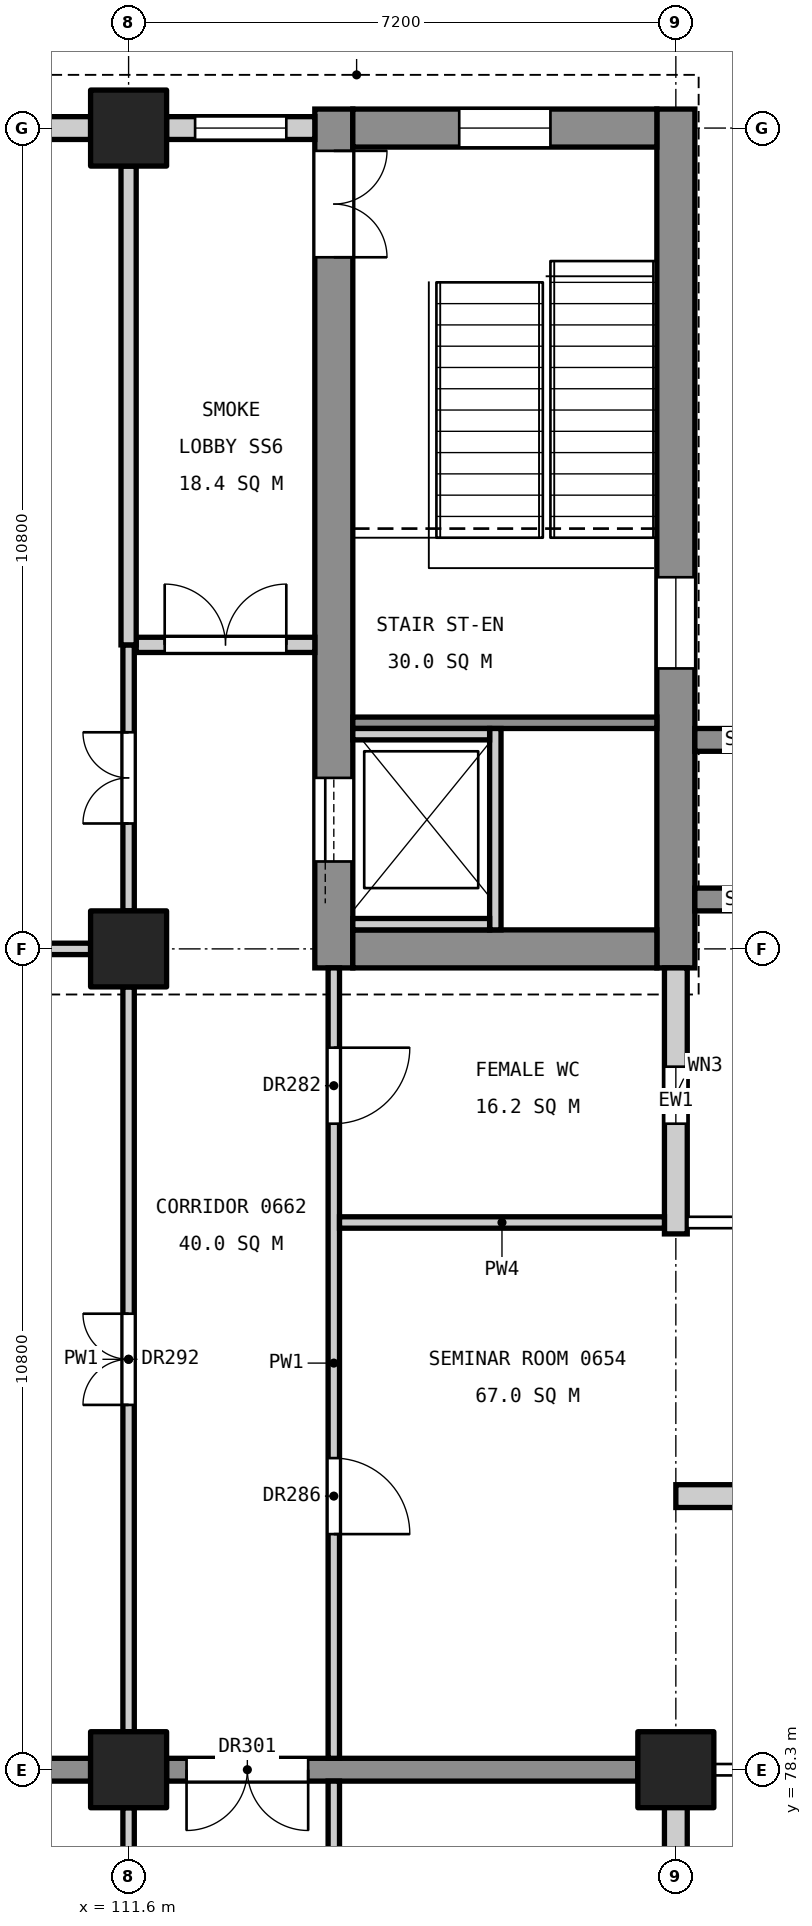
"""IFC4 building model, lengths in metres.
Left out: names, types, materials, properties, quantities, classifications, styles, units other than length and angle.
Written with IfcOpenShell. Run it as: python <this file> out.ifc"""

import sys

from ifc_helpers import new_model, si_unit, direction, frame, frame_2d, origin, origin_2d, place, context, subcontext, project, spatial, rectangle, extrude, element, fill, save


model = new_model("IFC4")
c1 = context("Model", 3, precision=1e-05, world=origin(), true_north=direction((0.0, 1.0)))
c2 = subcontext(c1, "Body", "Model", "MODEL_VIEW")
j1 = project(units=[si_unit("LENGTHUNIT", "METRE"), si_unit("PLANEANGLEUNIT", "RADIAN")], contexts=[c1])
p1 = place(None, origin())
s1 = spatial("IfcSite", under=j1, at=p1, CompositionType="ELEMENT")
p2 = place(p1, origin())
s2 = spatial("IfcBuilding", under=s1, at=p2, CompositionType="ELEMENT")
p3 = place(p2, frame((0.0, 0.0, 31.8)))
s3 = spatial("IfcBuildingStorey", under=s2, at=p3, CompositionType="ELEMENT", Elevation=31.8)
for number, where, z_axis, x_axis in (
    (1, (118.8, 78.3, 0.0), (0.0, 0.0, 1.0), (1.0, 0.0, 0.0)),
    (2, (111.6, 78.3, 0.0), (0.0, 0.0, 1.0), (1.0, 0.0, 0.0)),
    (3, (111.6, 89.1, 0.0), (0.0, 0.0, 1.0), (1.0, 0.0, 0.0)),
    (4, (111.6, 99.9, 0.0), (0.0, 0.0, 1.0), (1.0, 0.0, 0.0)),
):
    element("IfcColumn", number, at=place(p3, frame(where, z_axis=z_axis, x_axis=x_axis)), inside=s3, PredefinedType="COLUMN", context=c2, shape_type="SweptSolid", body=[
        extrude(rectangle(XDim=1.0, YDim=1.0, at=origin_2d()), origin(), (0.0, 0.0, 1.0), 4.8),
    ])
p4 = place(p3, frame((118.8, 88.85, 0.0), z_axis=(0.0, 0.0, 1.0), x_axis=(0.0, 1.0, 0.0)))
e5 = element("IfcWall", 5, at=p4, inside=s3, PredefinedType="SHEAR", context=c2, shape_type="SweptSolid", body=[
    extrude(rectangle(XDim=11.3, YDim=0.5, at=frame_2d((5.65, 0.0))), origin(), (0.0, 0.0, 1.0), 4.55),
])
p5 = place(p4, frame((3.94, 0.0, 3.4)))
e6 = element("IfcOpeningElement", 6, at=p5, cuts=e5, PredefinedType="OPENING", context=c2, shape_type="SweptSolid", body=[
    extrude(rectangle(XDim=1.2, YDim=0.9, at=frame_2d((0.6, 0.45))), frame((0.0, 0.26, 0.0), z_axis=(0.0, -1.0, 0.0), x_axis=(1.0, 0.0, 0.0)), (0.0, 0.0, 1.0), 0.52),
])
p6 = place(p3, frame((114.3, 88.85, 0.0), z_axis=(0.0, 0.0, 1.0), x_axis=(0.0, 1.0, 0.0)))
e7 = element("IfcWall", 7, at=p6, inside=s3, PredefinedType="SHEAR", context=c2, shape_type="SweptSolid", body=[
    extrude(rectangle(XDim=11.3, YDim=0.5, at=frame_2d((5.65, 0.0))), origin(), (0.0, 0.0, 1.0), 4.55),
])
p7 = place(p6, frame((9.35, 0.0, 0.0)))
e8 = element("IfcOpeningElement", 8, at=p7, cuts=e7, PredefinedType="OPENING", context=c2, shape_type="SweptSolid", body=[
    extrude(rectangle(XDim=1.4, YDim=2.1, at=frame_2d((0.7, 1.05))), frame((0.0, 0.26, 0.0), z_axis=(0.0, -1.0, 0.0), x_axis=(1.0, 0.0, 0.0)), (0.0, 0.0, 1.0), 0.52),
])
p8 = place(p6, frame((1.4, 0.0, 0.0)))
e9 = element("IfcOpeningElement", 9, at=p8, cuts=e7, PredefinedType="OPENING", context=c2, shape_type="SweptSolid", body=[
    extrude(rectangle(XDim=1.1, YDim=2.1, at=frame_2d((0.55, 1.05))), frame((0.0, 0.26, 0.0), z_axis=(0.0, -1.0, 0.0), x_axis=(1.0, 0.0, 0.0)), (0.0, 0.0, 1.0), 0.52),
])
p9 = place(p3, frame((118.55, 89.1, 0.0), z_axis=(0.0, 0.0, 1.0), x_axis=(-1.0, 0.0, 0.0)))
e10 = element("IfcWall", 10, at=p9, inside=s3, PredefinedType="SHEAR", context=c2, shape_type="SweptSolid", body=[
    extrude(rectangle(XDim=4.0, YDim=0.5, at=frame_2d((2.0, 0.0))), origin(), (0.0, 0.0, 1.0), 4.55),
])
p10 = place(p3, frame((118.55, 99.9, 0.0), z_axis=(0.0, 0.0, 1.0), x_axis=(-1.0, 0.0, 0.0)))
e11 = element("IfcWall", 11, at=p10, inside=s3, PredefinedType="SHEAR", context=c2, shape_type="SweptSolid", body=[
    extrude(rectangle(XDim=4.0, YDim=0.5, at=frame_2d((2.0, 0.0))), origin(), (0.0, 0.0, 1.0), 4.55),
])
p11 = place(p10, frame((1.4, 0.0, 3.4)))
e12 = element("IfcOpeningElement", 12, at=p11, cuts=e11, PredefinedType="OPENING", context=c2, shape_type="SweptSolid", body=[
    extrude(rectangle(XDim=1.2, YDim=0.9, at=frame_2d((0.6, 0.45))), frame((0.0, 0.26, 0.0), z_axis=(0.0, -1.0, 0.0), x_axis=(1.0, 0.0, 0.0)), (0.0, 0.0, 1.0), 0.52),
])
for number, where, z_axis, x_axis in (
    (13, (119.05, 89.75, 0.0), (0.0, 0.0, 1.0), (1.0, 0.0, 0.0)),
    (14, (119.05, 91.85, 0.0), (0.0, 0.0, 1.0), (1.0, 0.0, 0.0)),
):
    element("IfcWall", number, at=place(p3, frame(where, z_axis=z_axis, x_axis=x_axis)), inside=s3, PredefinedType="SHEAR", context=c2, shape_type="SweptSolid", body=[
        extrude(rectangle(XDim=1.25, YDim=0.3, at=frame_2d((0.625, 0.0))), origin(), (0.0, 0.0, 1.0), 4.8),
    ])
p12 = place(p3, frame((118.3, 78.3, 0.0), z_axis=(0.0, 0.0, 1.0), x_axis=(-1.0, 0.0, 0.0)))
e15 = element("IfcWall", 15, at=p12, inside=s3, PredefinedType="SHEAR", context=c2, shape_type="SweptSolid", body=[
    extrude(rectangle(XDim=6.2, YDim=0.3, at=frame_2d((3.1, 0.0))), origin(), (0.0, 0.0, 1.0), 4.55),
])
p13 = place(p12, frame((4.337, 0.0, 0.0)))
e16 = element("IfcOpeningElement", 16, at=p13, cuts=e15, PredefinedType="OPENING", context=c2, shape_type="SweptSolid", body=[
    extrude(rectangle(XDim=1.6, YDim=2.1, at=frame_2d((0.8, 1.05))), frame((0.0, 0.16, 0.0), z_axis=(0.0, -1.0, 0.0), x_axis=(1.0, 0.0, 0.0)), (0.0, 0.0, 1.0), 0.32),
])
p14 = place(p3, frame((111.1, 78.3, 0.0), z_axis=(0.0, 0.0, 1.0), x_axis=(-1.0, 0.0, 0.0)))
e17 = element("IfcWall", 17, at=p14, inside=s3, PredefinedType="SHEAR", context=c2, shape_type="SweptSolid", body=[
    extrude(rectangle(XDim=9.8, YDim=0.3, at=frame_2d((4.9, 0.0))), origin(), (0.0, 0.0, 1.0), 4.55),
])
p15 = place(p3, frame((118.55, 92.075, 0.0), z_axis=(0.0, 0.0, 1.0), x_axis=(-1.0, 0.0, 0.0)))
e18 = element("IfcWall", 18, at=p15, inside=s3, PredefinedType="SOLIDWALL", context=c2, shape_type="SweptSolid", body=[
    extrude(rectangle(XDim=4.0, YDim=0.15, at=frame_2d((2.0, 0.0))), origin(), (0.0, 0.0, 1.0), 4.55),
])
p16 = place(p3, frame((116.425, 92.0, 0.0), z_axis=(0.0, 0.0, 1.0), x_axis=(0.0, -1.0, 0.0)))
e19 = element("IfcWall", 19, at=p16, inside=s3, PredefinedType="SOLIDWALL", context=c2, shape_type="SweptSolid", body=[
    extrude(rectangle(XDim=2.65, YDim=0.15, at=frame_2d((1.325, 0.0))), origin(), (0.0, 0.0, 1.0), 4.8),
])
for number, where, z_axis, x_axis in (
    (20, (116.35, 91.925, 0.0), (0.0, 0.0, 1.0), (-1.0, 0.0, 0.0)),
    (21, (116.35, 89.425, 0.0), (0.0, 0.0, 1.0), (-1.0, 0.0, 0.0)),
):
    element("IfcWall", number, at=place(p3, frame(where, z_axis=z_axis, x_axis=x_axis)), inside=s3, PredefinedType="SOLIDWALL", context=c2, shape_type="SweptSolid", body=[
        extrude(rectangle(XDim=1.8, YDim=0.15, at=frame_2d((0.9, 0.0))), origin(), (0.0, 0.0, 1.0), 4.8),
    ])
p17 = place(p3, frame((118.8, 74.95, 0.0), z_axis=(0.0, 0.0, 1.0), x_axis=(0.0, 1.0, 0.0)))
e22 = element("IfcWall", 22, at=p17, inside=s3, PredefinedType="STANDARD", context=c2, shape_type="SweptSolid", body=[
    extrude(rectangle(XDim=3.5, YDim=0.3, at=frame_2d((1.75, 0.0))), origin(), (0.0, 0.0, 1.0), 3.65),
])
p18 = place(p17, frame((1.3, 0.0, 0.8)))
e23 = element("IfcOpeningElement", 23, at=p18, cuts=e22, PredefinedType="OPENING", context=c2, shape_type="SweptSolid", body=[
    extrude(rectangle(XDim=0.75, YDim=1.2, at=frame_2d((0.375, 0.6))), frame((0.0, 0.16, 0.0), z_axis=(0.0, -1.0, 0.0), x_axis=(1.0, 0.0, 0.0)), (0.0, 0.0, 1.0), 0.32),
])
p19 = place(p3, frame((118.8, 85.35, 0.0), z_axis=(0.0, 0.0, 1.0), x_axis=(0.0, 1.0, 0.0)))
e24 = element("IfcWall", 24, at=p19, inside=s3, PredefinedType="STANDARD", context=c2, shape_type="SweptSolid", body=[
    extrude(rectangle(XDim=3.5, YDim=0.3, at=frame_2d((1.75, 0.0))), origin(), (0.0, 0.0, 1.0), 3.65),
])
p20 = place(p19, frame((1.45, 0.0, 0.8)))
e25 = element("IfcOpeningElement", 25, at=p20, cuts=e24, PredefinedType="OPENING", context=c2, shape_type="SweptSolid", body=[
    extrude(rectangle(XDim=0.75, YDim=1.2, at=frame_2d((0.375, 0.6))), frame((0.0, 0.16, 0.0), z_axis=(0.0, -1.0, 0.0), x_axis=(1.0, 0.0, 0.0)), (0.0, 0.0, 1.0), 0.32),
])
p21 = place(p3, frame((114.05, 99.9, 0.0), z_axis=(0.0, 0.0, 1.0), x_axis=(-1.0, 0.0, 0.0)))
e26 = element("IfcWall", 26, at=p21, inside=s3, PredefinedType="STANDARD", context=c2, shape_type="SweptSolid", body=[
    extrude(rectangle(XDim=1.95, YDim=0.3, at=frame_2d((0.975, 0.0))), origin(), (0.0, 0.0, 1.0), 3.85),
])
p22 = place(p21, frame((0.375, 0.0, 0.9)))
e27 = element("IfcOpeningElement", 27, at=p22, cuts=e26, PredefinedType="OPENING", context=c2, shape_type="SweptSolid", body=[
    extrude(rectangle(XDim=1.2, YDim=2.4, at=frame_2d((0.6, 1.2))), frame((0.0, 0.16, 0.0), z_axis=(0.0, -1.0, 0.0), x_axis=(1.0, 0.0, 0.0)), (0.0, 0.0, 1.0), 0.32),
])
p23 = place(p3, frame((111.1, 99.9, 0.0), z_axis=(0.0, 0.0, 1.0), x_axis=(-1.0, 0.0, 0.0)))
e28 = element("IfcWall", 28, at=p23, inside=s3, PredefinedType="STANDARD", context=c2, shape_type="SweptSolid", body=[
    extrude(rectangle(XDim=9.8, YDim=0.3, at=frame_2d((4.9, 0.0))), origin(), (0.0, 0.0, 1.0), 3.85),
])
p24 = place(p23, frame((0.65, 0.0, 0.9)))
e29 = element("IfcOpeningElement", 29, at=p24, cuts=e28, PredefinedType="OPENING", context=c2, shape_type="SweptSolid", body=[
    extrude(rectangle(XDim=1.8, YDim=2.4, at=frame_2d((0.9, 1.2))), frame((0.0, 0.16, 0.0), z_axis=(0.0, -1.0, 0.0), x_axis=(1.0, 0.0, 0.0)), (0.0, 0.0, 1.0), 0.32),
])
p25 = place(p23, frame((4.525, 0.0, 0.8)))
e30 = element("IfcOpeningElement", 30, at=p25, cuts=e28, PredefinedType="OPENING", context=c2, shape_type="SweptSolid", body=[
    extrude(rectangle(XDim=0.75, YDim=1.2, at=frame_2d((0.375, 0.6))), frame((0.0, 0.16, 0.0), z_axis=(0.0, -1.0, 0.0), x_axis=(1.0, 0.0, 0.0)), (0.0, 0.0, 1.0), 0.32),
])
p26 = place(p23, frame((7.35, 0.0, 0.9)))
e31 = element("IfcOpeningElement", 31, at=p26, cuts=e28, PredefinedType="OPENING", context=c2, shape_type="SweptSolid", body=[
    extrude(rectangle(XDim=1.8, YDim=2.4, at=frame_2d((0.9, 1.2))), frame((0.0, 0.16, 0.0), z_axis=(0.0, -1.0, 0.0), x_axis=(1.0, 0.0, 0.0)), (0.0, 0.0, 1.0), 0.32),
])
p27 = place(p3, frame((123.6, 81.9, 0.0), z_axis=(0.0, 0.0, 1.0), x_axis=(-1.0, 0.0, 0.0)))
e32 = element("IfcWall", 32, at=p27, inside=s3, PredefinedType="STANDARD", context=c2, shape_type="SweptSolid", body=[
    extrude(rectangle(XDim=4.8, YDim=0.3, at=frame_2d((2.4, 0.0))), origin(), (0.0, 0.0, 1.0), 3.65),
])
p28 = place(p3, frame((114.3, 74.95, 0.0), z_axis=(0.0, 0.0, 1.0), x_axis=(0.0, 1.0, 0.0)))
e33 = element("IfcWall", 33, at=p28, inside=s3, PredefinedType="PARTITIONING", context=c2, shape_type="SweptSolid", body=[
    extrude(rectangle(XDim=3.2, YDim=0.15, at=frame_2d((1.6, 0.0))), origin(), (0.0, 0.0, 1.0), 3.55),
])
p29 = place(p28, frame((1.05, 0.0, 0.0)))
e34 = element("IfcOpeningElement", 34, at=p29, cuts=e33, PredefinedType="OPENING", context=c2, shape_type="SweptSolid", body=[
    extrude(rectangle(XDim=1.0, YDim=2.1, at=frame_2d((0.5, 1.05))), frame((0.0, 0.085, 0.0), z_axis=(0.0, -1.0, 0.0), x_axis=(1.0, 0.0, 0.0)), (0.0, 0.0, 1.0), 0.17),
])
p30 = place(p3, frame((114.3, 78.45, 0.0), z_axis=(0.0, 0.0, 1.0), x_axis=(0.0, 1.0, 0.0)))
e35 = element("IfcWall", 35, at=p30, inside=s3, PredefinedType="PARTITIONING", context=c2, shape_type="SweptSolid", body=[
    extrude(rectangle(XDim=10.4, YDim=0.15, at=frame_2d((5.2, 0.0))), origin(), (0.0, 0.0, 1.0), 3.55),
])
p31 = place(p30, frame((8.35, 0.0, 0.0)))
e36 = element("IfcOpeningElement", 36, at=p31, cuts=e35, PredefinedType="OPENING", context=c2, shape_type="SweptSolid", body=[
    extrude(rectangle(XDim=1.0, YDim=2.1, at=frame_2d((0.5, 1.05))), frame((0.0, 0.085, 0.0), z_axis=(0.0, -1.0, 0.0), x_axis=(1.0, 0.0, 0.0)), (0.0, 0.0, 1.0), 0.17),
])
p32 = place(p30, frame((2.95, 0.0, 0.0)))
e37 = element("IfcOpeningElement", 37, at=p32, cuts=e35, PredefinedType="OPENING", context=c2, shape_type="SweptSolid", body=[
    extrude(rectangle(XDim=1.0, YDim=2.1, at=frame_2d((0.5, 1.05))), frame((0.0, 0.085, 0.0), z_axis=(0.0, -1.0, 0.0), x_axis=(1.0, 0.0, 0.0)), (0.0, 0.0, 1.0), 0.17),
])
p33 = place(p3, frame((118.65, 85.5, 0.0), z_axis=(0.0, 0.0, 1.0), x_axis=(-1.0, 0.0, 0.0)))
e38 = element("IfcWall", 38, at=p33, inside=s3, PredefinedType="PARTITIONING", context=c2, shape_type="SweptSolid", body=[
    extrude(rectangle(XDim=4.275, YDim=0.15, at=frame_2d((2.137, 0.0))), origin(), (0.0, 0.0, 1.0), 3.85),
])
p34 = place(p3, frame((114.05, 93.1, 0.0), z_axis=(0.0, 0.0, 1.0), x_axis=(-1.0, 0.0, 0.0)))
e39 = element("IfcWall", 39, at=p34, inside=s3, PredefinedType="PARTITIONING", context=c2, shape_type="SweptSolid", body=[
    extrude(rectangle(XDim=2.35, YDim=0.2, at=frame_2d((1.175, 0.0))), origin(), (0.0, 0.0, 1.0), 3.55),
])
p35 = place(p34, frame((0.375, 0.0, 0.0)))
e40 = element("IfcOpeningElement", 40, at=p35, cuts=e39, PredefinedType="OPENING", context=c2, shape_type="SweptSolid", body=[
    extrude(rectangle(XDim=1.6, YDim=2.1, at=frame_2d((0.8, 1.05))), frame((0.0, 0.11, 0.0), z_axis=(0.0, -1.0, 0.0), x_axis=(1.0, 0.0, 0.0)), (0.0, 0.0, 1.0), 0.22),
])
p36 = place(p3, frame((111.6, 78.8, 0.0), z_axis=(0.0, 0.0, 1.0), x_axis=(0.0, 1.0, 0.0)))
e41 = element("IfcWall", 41, at=p36, inside=s3, PredefinedType="PARTITIONING", context=c2, shape_type="SweptSolid", body=[
    extrude(rectangle(XDim=9.8, YDim=0.15, at=frame_2d((4.9, 0.0))), origin(), (0.0, 0.0, 1.0), 3.55),
])
p37 = place(p36, frame((4.3, 0.0, 0.0)))
e42 = element("IfcOpeningElement", 42, at=p37, cuts=e41, PredefinedType="OPENING", context=c2, shape_type="SweptSolid", body=[
    extrude(rectangle(XDim=1.2, YDim=2.1, at=frame_2d((0.6, 1.05))), frame((0.0, 0.085, 0.0), z_axis=(0.0, -1.0, 0.0), x_axis=(1.0, 0.0, 0.0)), (0.0, 0.0, 1.0), 0.17),
])
p38 = place(p3, frame((111.6, 89.6, 0.0), z_axis=(0.0, 0.0, 1.0), x_axis=(0.0, 1.0, 0.0)))
e43 = element("IfcWall", 43, at=p38, inside=s3, PredefinedType="PARTITIONING", context=c2, shape_type="SweptSolid", body=[
    extrude(rectangle(XDim=3.5, YDim=0.15, at=frame_2d((1.75, 0.0))), origin(), (0.0, 0.0, 1.0), 3.55),
])
p39 = place(p38, frame((1.15, 0.0, 0.0)))
e44 = element("IfcOpeningElement", 44, at=p39, cuts=e43, PredefinedType="OPENING", context=c2, shape_type="SweptSolid", body=[
    extrude(rectangle(XDim=1.2, YDim=2.1, at=frame_2d((0.6, 1.05))), frame((0.0, 0.085, 0.0), z_axis=(0.0, -1.0, 0.0), x_axis=(1.0, 0.0, 0.0)), (0.0, 0.0, 1.0), 0.17),
])
p40 = place(p3, frame((111.6, 93.1, 0.0), z_axis=(0.0, 0.0, 1.0), x_axis=(0.0, 1.0, 0.0)))
e45 = element("IfcWall", 45, at=p40, inside=s3, PredefinedType="PARTITIONING", context=c2, shape_type="SweptSolid", body=[
    extrude(rectangle(XDim=6.3, YDim=0.2, at=frame_2d((3.15, 0.0))), origin(), (0.0, 0.0, 1.0), 3.55),
])
p41 = place(p3, frame((111.6, 72.65, 0.0), z_axis=(0.0, 0.0, 1.0), x_axis=(0.0, 1.0, 0.0)))
e46 = element("IfcWall", 46, at=p41, inside=s3, PredefinedType="PARTITIONING", context=c2, shape_type="SweptSolid", body=[
    extrude(rectangle(XDim=5.15, YDim=0.15, at=frame_2d((2.575, 0.0))), origin(), (0.0, 0.0, 1.0), 3.55),
])
p42 = place(p41, frame((1.975, 0.0, 0.0)))
e47 = element("IfcOpeningElement", 47, at=p42, cuts=e46, PredefinedType="OPENING", context=c2, shape_type="SweptSolid", body=[
    extrude(rectangle(XDim=1.2, YDim=2.1, at=frame_2d((0.6, 1.05))), frame((0.0, 0.085, 0.0), z_axis=(0.0, -1.0, 0.0), x_axis=(1.0, 0.0, 0.0)), (0.0, 0.0, 1.0), 0.17),
])
p43 = place(p3, frame((111.1, 89.1, 0.0), z_axis=(0.0, 0.0, 1.0), x_axis=(-1.0, 0.0, 0.0)))
e48 = element("IfcWall", 48, at=p43, inside=s3, PredefinedType="PARTITIONING", context=c2, shape_type="SweptSolid", body=[
    extrude(rectangle(XDim=9.8, YDim=0.15, at=frame_2d((4.9, 0.0))), origin(), (0.0, 0.0, 1.0), 3.85),
])
p44 = place(p7, frame((1.4, 0.0, 0.0), z_axis=(0.0, 0.0, 1.0), x_axis=(-1.0, 0.0, 0.0)))
e49 = element("IfcDoor", 49, at=p44, inside=s3, OperationType="DOUBLE_DOOR_SINGLE_SWING", PredefinedType="DOOR", context=c2, shape_type="SweptSolid", body=[
    extrude(rectangle(XDim=1.4, YDim=2.1, at=frame_2d((0.7, 1.05))), frame((0.0, 0.025, 0.0), z_axis=(0.0, -1.0, 0.0), x_axis=(1.0, 0.0, 0.0)), (0.0, 0.0, 1.0), 0.05),
])
fill(e8, e49)
p45 = place(p8, origin())
e50 = element("IfcDoor", 50, at=p45, inside=s3, OperationType="SLIDING_TO_LEFT", PredefinedType="DOOR", context=c2, shape_type="SweptSolid", body=[
    extrude(rectangle(XDim=1.1, YDim=2.1, at=frame_2d((0.55, 1.05))), frame((0.0, 0.025, 0.0), z_axis=(0.0, -1.0, 0.0), x_axis=(1.0, 0.0, 0.0)), (0.0, 0.0, 1.0), 0.05),
])
fill(e9, e50)
p46 = place(p20, origin())
e51 = element("IfcWindow", 51, at=p46, inside=s3, PartitioningType="SINGLE_PANEL", PredefinedType="WINDOW", context=c2, shape_type="SweptSolid", body=[
    extrude(rectangle(XDim=0.75, YDim=1.2, at=frame_2d((0.375, 0.6))), frame((0.0, 0.03, 0.0), z_axis=(0.0, -1.0, 0.0), x_axis=(1.0, 0.0, 0.0)), (0.0, 0.0, 1.0), 0.06),
])
fill(e25, e51)
p47 = place(p22, origin())
e52 = element("IfcWindow", 52, at=p47, inside=s3, PartitioningType="SINGLE_PANEL", PredefinedType="WINDOW", context=c2, shape_type="SweptSolid", body=[
    extrude(rectangle(XDim=1.2, YDim=2.4, at=frame_2d((0.6, 1.2))), frame((0.0, 0.03, 0.0), z_axis=(0.0, -1.0, 0.0), x_axis=(1.0, 0.0, 0.0)), (0.0, 0.0, 1.0), 0.06),
])
fill(e27, e52)
p48 = place(p5, origin())
e53 = element("IfcWindow", 53, at=p48, inside=s3, PartitioningType="SINGLE_PANEL", PredefinedType="WINDOW", context=c2, shape_type="SweptSolid", body=[
    extrude(rectangle(XDim=1.2, YDim=0.9, at=frame_2d((0.6, 0.45))), frame((0.0, 0.03, 0.0), z_axis=(0.0, -1.0, 0.0), x_axis=(1.0, 0.0, 0.0)), (0.0, 0.0, 1.0), 0.06),
])
fill(e6, e53)
p49 = place(p11, origin())
e54 = element("IfcWindow", 54, at=p49, inside=s3, PartitioningType="SINGLE_PANEL", PredefinedType="WINDOW", context=c2, shape_type="SweptSolid", body=[
    extrude(rectangle(XDim=1.2, YDim=0.9, at=frame_2d((0.6, 0.45))), frame((0.0, 0.03, 0.0), z_axis=(0.0, -1.0, 0.0), x_axis=(1.0, 0.0, 0.0)), (0.0, 0.0, 1.0), 0.06),
])
fill(e12, e54)
p50 = place(p31, frame((1.0, 0.0, 0.0), z_axis=(0.0, 0.0, 1.0), x_axis=(-1.0, 0.0, 0.0)))
e55 = element("IfcDoor", 55, at=p50, inside=s3, OperationType="SINGLE_SWING_LEFT", PredefinedType="DOOR", context=c2, shape_type="SweptSolid", body=[
    extrude(rectangle(XDim=1.0, YDim=2.1, at=frame_2d((0.5, 1.05))), frame((0.0, 0.025, 0.0), z_axis=(0.0, -1.0, 0.0), x_axis=(1.0, 0.0, 0.0)), (0.0, 0.0, 1.0), 0.05),
])
fill(e36, e55)
p51 = place(p32, frame((1.0, 0.0, 0.0), z_axis=(0.0, 0.0, 1.0), x_axis=(-1.0, 0.0, 0.0)))
e56 = element("IfcDoor", 56, at=p51, inside=s3, OperationType="SINGLE_SWING_RIGHT", PredefinedType="DOOR", context=c2, shape_type="SweptSolid", body=[
    extrude(rectangle(XDim=1.0, YDim=2.1, at=frame_2d((0.5, 1.05))), frame((0.0, 0.025, 0.0), z_axis=(0.0, -1.0, 0.0), x_axis=(1.0, 0.0, 0.0)), (0.0, 0.0, 1.0), 0.05),
])
fill(e37, e56)
p52 = place(p37, origin())
e57 = element("IfcDoor", 57, at=p52, inside=s3, OperationType="DOUBLE_DOOR_SINGLE_SWING", PredefinedType="DOOR", context=c2, shape_type="SweptSolid", body=[
    extrude(rectangle(XDim=1.2, YDim=2.1, at=frame_2d((0.6, 1.05))), frame((0.0, 0.025, 0.0), z_axis=(0.0, -1.0, 0.0), x_axis=(1.0, 0.0, 0.0)), (0.0, 0.0, 1.0), 0.05),
])
fill(e42, e57)
p53 = place(p39, origin())
e58 = element("IfcDoor", 58, at=p53, inside=s3, OperationType="DOUBLE_DOOR_SINGLE_SWING", PredefinedType="DOOR", context=c2, shape_type="SweptSolid", body=[
    extrude(rectangle(XDim=1.2, YDim=2.1, at=frame_2d((0.6, 1.05))), frame((0.0, 0.025, 0.0), z_axis=(0.0, -1.0, 0.0), x_axis=(1.0, 0.0, 0.0)), (0.0, 0.0, 1.0), 0.05),
])
fill(e44, e58)
p54 = place(p35, frame((1.6, 0.0, 0.0), z_axis=(0.0, 0.0, 1.0), x_axis=(-1.0, 0.0, 0.0)))
e59 = element("IfcDoor", 59, at=p54, inside=s3, OperationType="DOUBLE_DOOR_SINGLE_SWING", PredefinedType="DOOR", context=c2, shape_type="SweptSolid", body=[
    extrude(rectangle(XDim=1.6, YDim=2.1, at=frame_2d((0.8, 1.05))), frame((0.0, 0.025, 0.0), z_axis=(0.0, -1.0, 0.0), x_axis=(1.0, 0.0, 0.0)), (0.0, 0.0, 1.0), 0.05),
])
fill(e40, e59)
p55 = place(p13, origin())
e60 = element("IfcDoor", 60, at=p55, inside=s3, OperationType="DOUBLE_DOOR_SINGLE_SWING", PredefinedType="DOOR", context=c2, shape_type="SweptSolid", body=[
    extrude(rectangle(XDim=1.6, YDim=2.1, at=frame_2d((0.8, 1.05))), frame((0.0, 0.025, 0.0), z_axis=(0.0, -1.0, 0.0), x_axis=(1.0, 0.0, 0.0)), (0.0, 0.0, 1.0), 0.05),
])
fill(e16, e60)
save(model, sys.argv[1])
